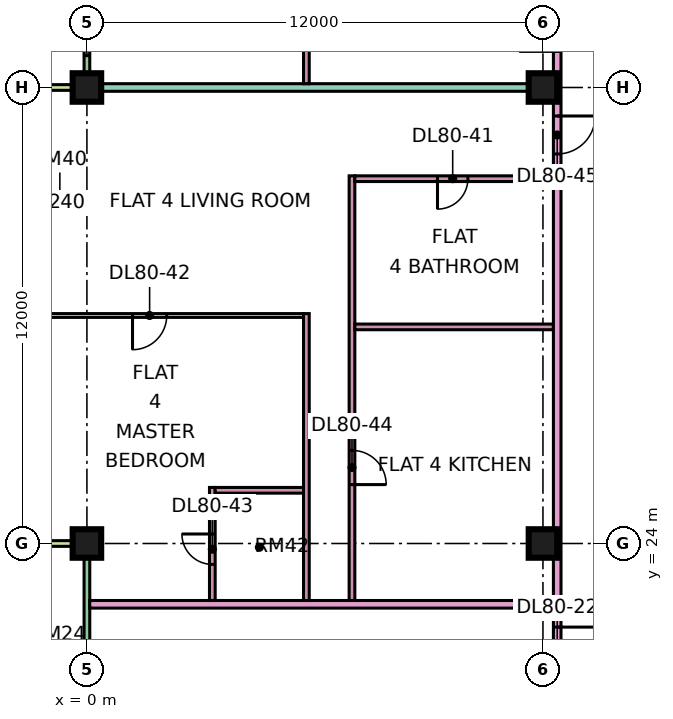
"""IFC4 building model, lengths in metres.
Left out: names, types, materials, properties, quantities, classifications, styles, units other than length and angle.
Written with IfcOpenShell. Run it as: python <this file> out.ifc"""

import sys

from ifc_helpers import new_model, si_unit, direction, frame, frame_2d, origin, origin_2d, place, context, subcontext, project, spatial, rectangle, extrude, element, fill, save


model = new_model("IFC4")
c1 = context("Model", 3, precision=1e-05, world=origin(), true_north=direction((0.0, 1.0)))
c2 = subcontext(c1, "Body", "Model", "MODEL_VIEW")
j1 = project(units=[si_unit("LENGTHUNIT", "METRE"), si_unit("PLANEANGLEUNIT", "RADIAN")], contexts=[c1])
p1 = place(None, origin())
s1 = spatial("IfcSite", under=j1, at=p1, CompositionType="ELEMENT")
p2 = place(p1, origin())
s2 = spatial("IfcBuilding", under=s1, at=p2, CompositionType="ELEMENT")
p3 = place(p2, frame((0.0, 0.0, 346.4)))
s3 = spatial("IfcBuildingStorey", under=s2, at=p3, CompositionType="ELEMENT", Elevation=346.4)
p4 = place(p3, frame((0.0, 24.0, 0.0), z_axis=(0.0, 0.0, 1.0), x_axis=(1.0, 0.0, 0.0)))
e1 = element("IfcColumn", 1, at=p4, inside=s3, PredefinedType="COLUMN", context=c2, shape_type="SweptSolid", body=[
    extrude(rectangle(XDim=0.75, YDim=0.75, at=origin_2d()), origin(), (0.0, 0.0, 1.0), 3.75),
])
p5 = place(p3, frame((0.0, 36.0, 0.0), z_axis=(0.0, 0.0, 1.0), x_axis=(1.0, 0.0, 0.0)))
e2 = element("IfcColumn", 2, at=p5, inside=s3, PredefinedType="COLUMN", context=c2, shape_type="SweptSolid", body=[
    extrude(rectangle(XDim=0.75, YDim=0.75, at=origin_2d()), origin(), (0.0, 0.0, 1.0), 3.75),
])
for number, where, z_axis, x_axis in (
    (3, (12.0, 24.0, 0.0), (0.0, 0.0, 1.0), (1.0, 0.0, 0.0)),
    (4, (12.0, 36.0, 0.0), (0.0, 0.0, 1.0), (1.0, 0.0, 0.0)),
):
    element("IfcColumn", number, at=place(p3, frame(where, z_axis=z_axis, x_axis=x_axis)), inside=s3, PredefinedType="COLUMN", context=c2, shape_type="SweptSolid", body=[
        extrude(rectangle(XDim=0.75, YDim=0.75, at=origin_2d()), origin(), (0.0, 0.0, 1.0), 3.75),
    ])
p6 = place(p3, frame((0.0, 47.925, 0.0), z_axis=(0.0, 0.0, 1.0), x_axis=(0.0, -1.0, 0.0)))
e5 = element("IfcWall", 5, at=p6, inside=s3, PredefinedType="SOLIDWALL", context=c2, shape_type="SweptSolid", body=[
    extrude(rectangle(XDim=11.85, YDim=0.15, at=frame_2d((5.925, 0.0))), origin(), (0.0, 0.0, 1.0), 3.35),
])
p7 = place(p6, frame((0.625, 0.0, 0.0)))
e6 = element("IfcOpeningElement", 6, at=p7, cuts=e5, PredefinedType="OPENING", context=c2, shape_type="SweptSolid", body=[
    extrude(rectangle(XDim=1.2, YDim=2.4, at=frame_2d((0.6, 1.2))), frame((0.0, 0.085, 0.0), z_axis=(0.0, -1.0, 0.0), x_axis=(1.0, 0.0, 0.0)), (0.0, 0.0, 1.0), 0.17),
])
p8 = place(p6, frame((3.762, 0.0, 0.45)))
e7 = element("IfcOpeningElement", 7, at=p8, cuts=e5, PredefinedType="OPENING", context=c2, shape_type="SweptSolid", body=[
    extrude(rectangle(XDim=1.8, YDim=2.4, at=frame_2d((0.9, 1.2))), frame((0.0, 0.085, 0.0), z_axis=(0.0, -1.0, 0.0), x_axis=(1.0, 0.0, 0.0)), (0.0, 0.0, 1.0), 0.17),
])
p9 = place(p6, frame((6.525, 0.0, 0.45)))
e8 = element("IfcOpeningElement", 8, at=p9, cuts=e5, PredefinedType="OPENING", context=c2, shape_type="SweptSolid", body=[
    extrude(rectangle(XDim=1.8, YDim=2.4, at=frame_2d((0.9, 1.2))), frame((0.0, 0.085, 0.0), z_axis=(0.0, -1.0, 0.0), x_axis=(1.0, 0.0, 0.0)), (0.0, 0.0, 1.0), 0.17),
])
p10 = place(p6, frame((9.288, 0.0, 0.45)))
e9 = element("IfcOpeningElement", 9, at=p10, cuts=e5, PredefinedType="OPENING", context=c2, shape_type="SweptSolid", body=[
    extrude(rectangle(XDim=1.8, YDim=2.4, at=frame_2d((0.9, 1.2))), frame((0.0, 0.085, 0.0), z_axis=(0.0, -1.0, 0.0), x_axis=(1.0, 0.0, 0.0)), (0.0, 0.0, 1.0), 0.17),
])
p11 = place(p3, frame((-1.5, 36.0, 0.0), z_axis=(0.0, 0.0, 1.0), x_axis=(1.0, 0.0, 0.0)))
e10 = element("IfcWall", 10, at=p11, inside=s3, PredefinedType="SOLIDWALL", context=c2, shape_type="SweptSolid", body=[
    extrude(rectangle(XDim=1.5, YDim=0.15, at=frame_2d((0.75, 0.0))), origin(), (0.0, 0.0, 1.0), 3.35),
])
p12 = place(p3, frame((0.0, 23.925, 0.0), z_axis=(0.0, 0.0, 1.0), x_axis=(0.0, -1.0, 0.0)))
e11 = element("IfcWall", 11, at=p12, inside=s3, PredefinedType="SOLIDWALL", context=c2, shape_type="SweptSolid", body=[
    extrude(rectangle(XDim=11.35, YDim=0.15, at=frame_2d((5.675, 0.0))), origin(), (0.0, 0.0, 1.0), 3.35),
])
p13 = place(p12, frame((6.738, 0.0, 0.0)))
e12 = element("IfcOpeningElement", 12, at=p13, cuts=e11, PredefinedType="OPENING", context=c2, shape_type="SweptSolid", body=[
    extrude(rectangle(XDim=1.8, YDim=2.4, at=frame_2d((0.9, 1.2))), frame((0.0, 0.085, 0.0), z_axis=(0.0, -1.0, 0.0), x_axis=(1.0, 0.0, 0.0)), (0.0, 0.0, 1.0), 0.17),
])
p14 = place(p3, frame((-1.5, 24.0, 0.0), z_axis=(0.0, 0.0, 1.0), x_axis=(1.0, 0.0, 0.0)))
e13 = element("IfcWall", 13, at=p14, inside=s3, PredefinedType="SOLIDWALL", context=c2, shape_type="SweptSolid", body=[
    extrude(rectangle(XDim=1.5, YDim=0.15, at=frame_2d((0.75, 0.0))), origin(), (0.0, 0.0, 1.0), 3.35),
])
p15 = place(p3, frame((-1.35, 30.0, 0.0), z_axis=(0.0, 0.0, 1.0), x_axis=(1.0, 0.0, 0.0)))
e14 = element("IfcWall", 14, at=p15, inside=s3, PredefinedType="PARTITIONING", context=c2, shape_type="SweptSolid", body=[
    extrude(rectangle(XDim=7.05, YDim=0.1, at=frame_2d((3.525, 0.0))), origin(), (0.0, 0.0, 1.0), 3.35),
])
p16 = place(p15, frame((2.55, 0.0, 0.0)))
e15 = element("IfcOpeningElement", 15, at=p16, cuts=e14, PredefinedType="OPENING", context=c2, shape_type="SweptSolid", body=[
    extrude(rectangle(XDim=0.9, YDim=2.1, at=frame_2d((0.45, 1.05))), frame((0.0, 0.06, 0.0), z_axis=(0.0, -1.0, 0.0), x_axis=(1.0, 0.0, 0.0)), (0.0, 0.0, 1.0), 0.12),
])
e16 = element("IfcWall", 16, at=p5, inside=s3, PredefinedType="PARTITIONING", context=c2, shape_type="SweptSolid", body=[
    extrude(rectangle(XDim=12.275, YDim=0.2, at=frame_2d((6.137, 0.0))), origin(), (0.0, 0.0, 1.0), 3.35),
])
p17 = place(p3, frame((0.074, 22.4, 0.0), z_axis=(0.0, 0.0, 1.0), x_axis=(1.0, 0.0, 0.0)))
e17 = element("IfcWall", 17, at=p17, inside=s3, PredefinedType="PARTITIONING", context=c2, shape_type="SweptSolid", body=[
    extrude(rectangle(XDim=12.201, YDim=0.2, at=frame_2d((6.101, 0.0))), origin(), (0.0, 0.0, 1.0), 3.35),
])
p18 = place(p3, frame((3.3, 22.5, 0.0), z_axis=(0.0, 0.0, 1.0), x_axis=(0.0, 1.0, 0.0)))
e18 = element("IfcWall", 18, at=p18, inside=s3, PredefinedType="PARTITIONING", context=c2, shape_type="SweptSolid", body=[
    extrude(rectangle(XDim=2.975, YDim=0.15, at=frame_2d((1.488, 0.0))), origin(), (0.0, 0.0, 1.0), 3.35),
])
p19 = place(p18, frame((0.95, 0.0, 0.0)))
e19 = element("IfcOpeningElement", 19, at=p19, cuts=e18, PredefinedType="OPENING", context=c2, shape_type="SweptSolid", body=[
    extrude(rectangle(XDim=0.8, YDim=2.1, at=frame_2d((0.4, 1.05))), frame((0.0, 0.085, 0.0), z_axis=(0.0, -1.0, 0.0), x_axis=(1.0, 0.0, 0.0)), (0.0, 0.0, 1.0), 0.17),
])
p20 = place(p3, frame((3.375, 25.4, 0.0), z_axis=(0.0, 0.0, 1.0), x_axis=(1.0, 0.0, 0.0)))
e20 = element("IfcWall", 20, at=p20, inside=s3, PredefinedType="PARTITIONING", context=c2, shape_type="SweptSolid", body=[
    extrude(rectangle(XDim=2.325, YDim=0.15, at=frame_2d((1.163, 0.0))), origin(), (0.0, 0.0, 1.0), 3.35),
])
p21 = place(p3, frame((5.775, 22.5, 0.0), z_axis=(0.0, 0.0, 1.0), x_axis=(0.0, 1.0, 0.0)))
e21 = element("IfcWall", 21, at=p21, inside=s3, PredefinedType="PARTITIONING", context=c2, shape_type="SweptSolid", body=[
    extrude(rectangle(XDim=7.55, YDim=0.15, at=frame_2d((3.775, 0.0))), origin(), (0.0, 0.0, 1.0), 3.35),
])
p22 = place(p3, frame((5.775, 36.1, 0.0), z_axis=(0.0, 0.0, 1.0), x_axis=(0.0, 1.0, 0.0)))
e22 = element("IfcWall", 22, at=p22, inside=s3, PredefinedType="PARTITIONING", context=c2, shape_type="SweptSolid", body=[
    extrude(rectangle(XDim=11.95, YDim=0.15, at=frame_2d((5.975, 0.0))), origin(), (0.0, 0.0, 1.0), 3.35),
])
p23 = place(p22, frame((0.95, 0.0, 0.0)))
e23 = element("IfcOpeningElement", 23, at=p23, cuts=e22, PredefinedType="OPENING", context=c2, shape_type="SweptSolid", body=[
    extrude(rectangle(XDim=0.9, YDim=2.1, at=frame_2d((0.45, 1.05))), frame((0.0, 0.085, 0.0), z_axis=(0.0, -1.0, 0.0), x_axis=(1.0, 0.0, 0.0)), (0.0, 0.0, 1.0), 0.17),
])
p24 = place(p22, frame((9.95, 0.0, 0.0)))
e24 = element("IfcOpeningElement", 24, at=p24, cuts=e22, PredefinedType="OPENING", context=c2, shape_type="SweptSolid", body=[
    extrude(rectangle(XDim=0.9, YDim=2.1, at=frame_2d((0.45, 1.05))), frame((0.0, 0.085, 0.0), z_axis=(0.0, -1.0, 0.0), x_axis=(1.0, 0.0, 0.0)), (0.0, 0.0, 1.0), 0.17),
])
p25 = place(p22, frame((4.8, 0.0, 0.0)))
e25 = element("IfcOpeningElement", 25, at=p25, cuts=e22, PredefinedType="OPENING", context=c2, shape_type="SweptSolid", body=[
    extrude(rectangle(XDim=0.8, YDim=2.1, at=frame_2d((0.4, 1.05))), frame((0.0, 0.085, 0.0), z_axis=(0.0, -1.0, 0.0), x_axis=(1.0, 0.0, 0.0)), (0.0, 0.0, 1.0), 0.17),
])
p26 = place(p3, frame((6.975, 22.5, 0.0), z_axis=(0.0, 0.0, 1.0), x_axis=(0.0, 1.0, 0.0)))
e26 = element("IfcWall", 26, at=p26, inside=s3, PredefinedType="PARTITIONING", context=c2, shape_type="SweptSolid", body=[
    extrude(rectangle(XDim=11.175, YDim=0.15, at=frame_2d((5.587, 0.0))), origin(), (0.0, 0.0, 1.0), 3.35),
])
p27 = place(p26, frame((3.05, 0.0, 0.0)))
e27 = element("IfcOpeningElement", 27, at=p27, cuts=e26, PredefinedType="OPENING", context=c2, shape_type="SweptSolid", body=[
    extrude(rectangle(XDim=0.9, YDim=2.1, at=frame_2d((0.45, 1.05))), frame((0.0, 0.085, 0.0), z_axis=(0.0, -1.0, 0.0), x_axis=(1.0, 0.0, 0.0)), (0.0, 0.0, 1.0), 0.17),
])
p28 = place(p3, frame((7.05, 29.7, 0.0), z_axis=(0.0, 0.0, 1.0), x_axis=(1.0, 0.0, 0.0)))
e28 = element("IfcWall", 28, at=p28, inside=s3, PredefinedType="PARTITIONING", context=c2, shape_type="SweptSolid", body=[
    extrude(rectangle(XDim=5.225, YDim=0.15, at=frame_2d((2.612, 0.0))), origin(), (0.0, 0.0, 1.0), 3.35),
])
p29 = place(p3, frame((7.05, 33.6, 0.0), z_axis=(0.0, 0.0, 1.0), x_axis=(1.0, 0.0, 0.0)))
e29 = element("IfcWall", 29, at=p29, inside=s3, PredefinedType="PARTITIONING", context=c2, shape_type="SweptSolid", body=[
    extrude(rectangle(XDim=5.225, YDim=0.15, at=frame_2d((2.612, 0.0))), origin(), (0.0, 0.0, 1.0), 3.35),
])
p30 = place(p29, frame((2.175, 0.0, 0.0)))
e30 = element("IfcOpeningElement", 30, at=p30, cuts=e29, PredefinedType="OPENING", context=c2, shape_type="SweptSolid", body=[
    extrude(rectangle(XDim=0.8, YDim=2.1, at=frame_2d((0.4, 1.05))), frame((0.0, 0.085, 0.0), z_axis=(0.0, -1.0, 0.0), x_axis=(1.0, 0.0, 0.0)), (0.0, 0.0, 1.0), 0.17),
])
p31 = place(p3, frame((12.375, 20.0, 0.0), z_axis=(0.0, 0.0, 1.0), x_axis=(0.0, 1.0, 0.0)))
e31 = element("IfcWall", 31, at=p31, inside=s3, PredefinedType="PARTITIONING", context=c2, shape_type="SweptSolid", body=[
    extrude(rectangle(XDim=33.926, YDim=0.2, at=frame_2d((16.963, 0.0))), origin(), (0.0, 0.0, 1.0), 3.35),
])
p32 = place(p31, frame((16.95, 0.0, 0.0)))
e32 = element("IfcOpeningElement", 32, at=p32, cuts=e31, PredefinedType="OPENING", context=c2, shape_type="SweptSolid", body=[
    extrude(rectangle(XDim=1.0, YDim=2.1, at=frame_2d((0.5, 1.05))), frame((0.0, 0.11, 0.0), z_axis=(0.0, -1.0, 0.0), x_axis=(1.0, 0.0, 0.0)), (0.0, 0.0, 1.0), 0.22),
])
p33 = place(p31, frame((0.6, 0.0, 0.0)))
e33 = element("IfcOpeningElement", 33, at=p33, cuts=e31, PredefinedType="OPENING", context=c2, shape_type="SweptSolid", body=[
    extrude(rectangle(XDim=1.2, YDim=2.1, at=frame_2d((0.6, 1.05))), frame((0.0, 0.11, 0.0), z_axis=(0.0, -1.0, 0.0), x_axis=(1.0, 0.0, 0.0)), (0.0, 0.0, 1.0), 0.22),
])
p34 = place(p31, frame((14.25, 0.0, 0.0)))
e34 = element("IfcOpeningElement", 34, at=p34, cuts=e31, PredefinedType="OPENING", context=c2, shape_type="SweptSolid", body=[
    extrude(rectangle(XDim=1.0, YDim=2.1, at=frame_2d((0.5, 1.05))), frame((0.0, 0.11, 0.0), z_axis=(0.0, -1.0, 0.0), x_axis=(1.0, 0.0, 0.0)), (0.0, 0.0, 1.0), 0.22),
])
p35 = place(p10, origin())
e35 = element("IfcWindow", 35, at=p35, inside=s3, PartitioningType="SINGLE_PANEL", PredefinedType="WINDOW", context=c2, shape_type="SweptSolid", body=[
    extrude(rectangle(XDim=1.8, YDim=2.4, at=frame_2d((0.9, 1.2))), frame((0.0, 0.03, 0.0), z_axis=(0.0, -1.0, 0.0), x_axis=(1.0, 0.0, 0.0)), (0.0, 0.0, 1.0), 0.06),
])
fill(e9, e35)
p36 = place(p33, origin())
e36 = element("IfcDoor", 36, at=p36, inside=s3, OperationType="SINGLE_SWING_RIGHT", PredefinedType="DOOR", context=c2, shape_type="SweptSolid", body=[
    extrude(rectangle(XDim=1.2, YDim=2.1, at=frame_2d((0.6, 1.05))), frame((0.0, 0.025, 0.0), z_axis=(0.0, -1.0, 0.0), x_axis=(1.0, 0.0, 0.0)), (0.0, 0.0, 1.0), 0.05),
])
fill(e33, e36)
p37 = place(p30, frame((0.8, 0.0, 0.0), z_axis=(0.0, 0.0, 1.0), x_axis=(-1.0, 0.0, 0.0)))
e37 = element("IfcDoor", 37, at=p37, inside=s3, OperationType="SINGLE_SWING_LEFT", PredefinedType="DOOR", context=c2, shape_type="SweptSolid", body=[
    extrude(rectangle(XDim=0.8, YDim=2.1, at=frame_2d((0.4, 1.05))), frame((0.0, 0.025, 0.0), z_axis=(0.0, -1.0, 0.0), x_axis=(1.0, 0.0, 0.0)), (0.0, 0.0, 1.0), 0.05),
])
fill(e30, e37)
p38 = place(p16, frame((0.9, 0.0, 0.0), z_axis=(0.0, 0.0, 1.0), x_axis=(-1.0, 0.0, 0.0)))
e38 = element("IfcDoor", 38, at=p38, inside=s3, OperationType="SINGLE_SWING_LEFT", PredefinedType="DOOR", context=c2, shape_type="SweptSolid", body=[
    extrude(rectangle(XDim=0.9, YDim=2.1, at=frame_2d((0.45, 1.05))), frame((0.0, 0.025, 0.0), z_axis=(0.0, -1.0, 0.0), x_axis=(1.0, 0.0, 0.0)), (0.0, 0.0, 1.0), 0.05),
])
fill(e15, e38)
p39 = place(p19, frame((0.8, 0.0, 0.0), z_axis=(0.0, 0.0, 1.0), x_axis=(-1.0, 0.0, 0.0)))
e39 = element("IfcDoor", 39, at=p39, inside=s3, OperationType="SINGLE_SWING_RIGHT", PredefinedType="DOOR", context=c2, shape_type="SweptSolid", body=[
    extrude(rectangle(XDim=0.8, YDim=2.1, at=frame_2d((0.4, 1.05))), frame((0.0, 0.025, 0.0), z_axis=(0.0, -1.0, 0.0), x_axis=(1.0, 0.0, 0.0)), (0.0, 0.0, 1.0), 0.05),
])
fill(e19, e39)
p40 = place(p27, frame((0.9, 0.0, 0.0), z_axis=(0.0, 0.0, 1.0), x_axis=(-1.0, 0.0, 0.0)))
e40 = element("IfcDoor", 40, at=p40, inside=s3, OperationType="SINGLE_SWING_LEFT", PredefinedType="DOOR", context=c2, shape_type="SweptSolid", body=[
    extrude(rectangle(XDim=0.9, YDim=2.1, at=frame_2d((0.45, 1.05))), frame((0.0, 0.025, 0.0), z_axis=(0.0, -1.0, 0.0), x_axis=(1.0, 0.0, 0.0)), (0.0, 0.0, 1.0), 0.05),
])
fill(e27, e40)
p41 = place(p34, origin())
e41 = element("IfcDoor", 41, at=p41, inside=s3, OperationType="SINGLE_SWING_RIGHT", PredefinedType="DOOR", context=c2, shape_type="SweptSolid", body=[
    extrude(rectangle(XDim=1.0, YDim=2.1, at=frame_2d((0.5, 1.05))), frame((0.0, 0.025, 0.0), z_axis=(0.0, -1.0, 0.0), x_axis=(1.0, 0.0, 0.0)), (0.0, 0.0, 1.0), 0.05),
])
fill(e34, e41)
save(model, sys.argv[1])
